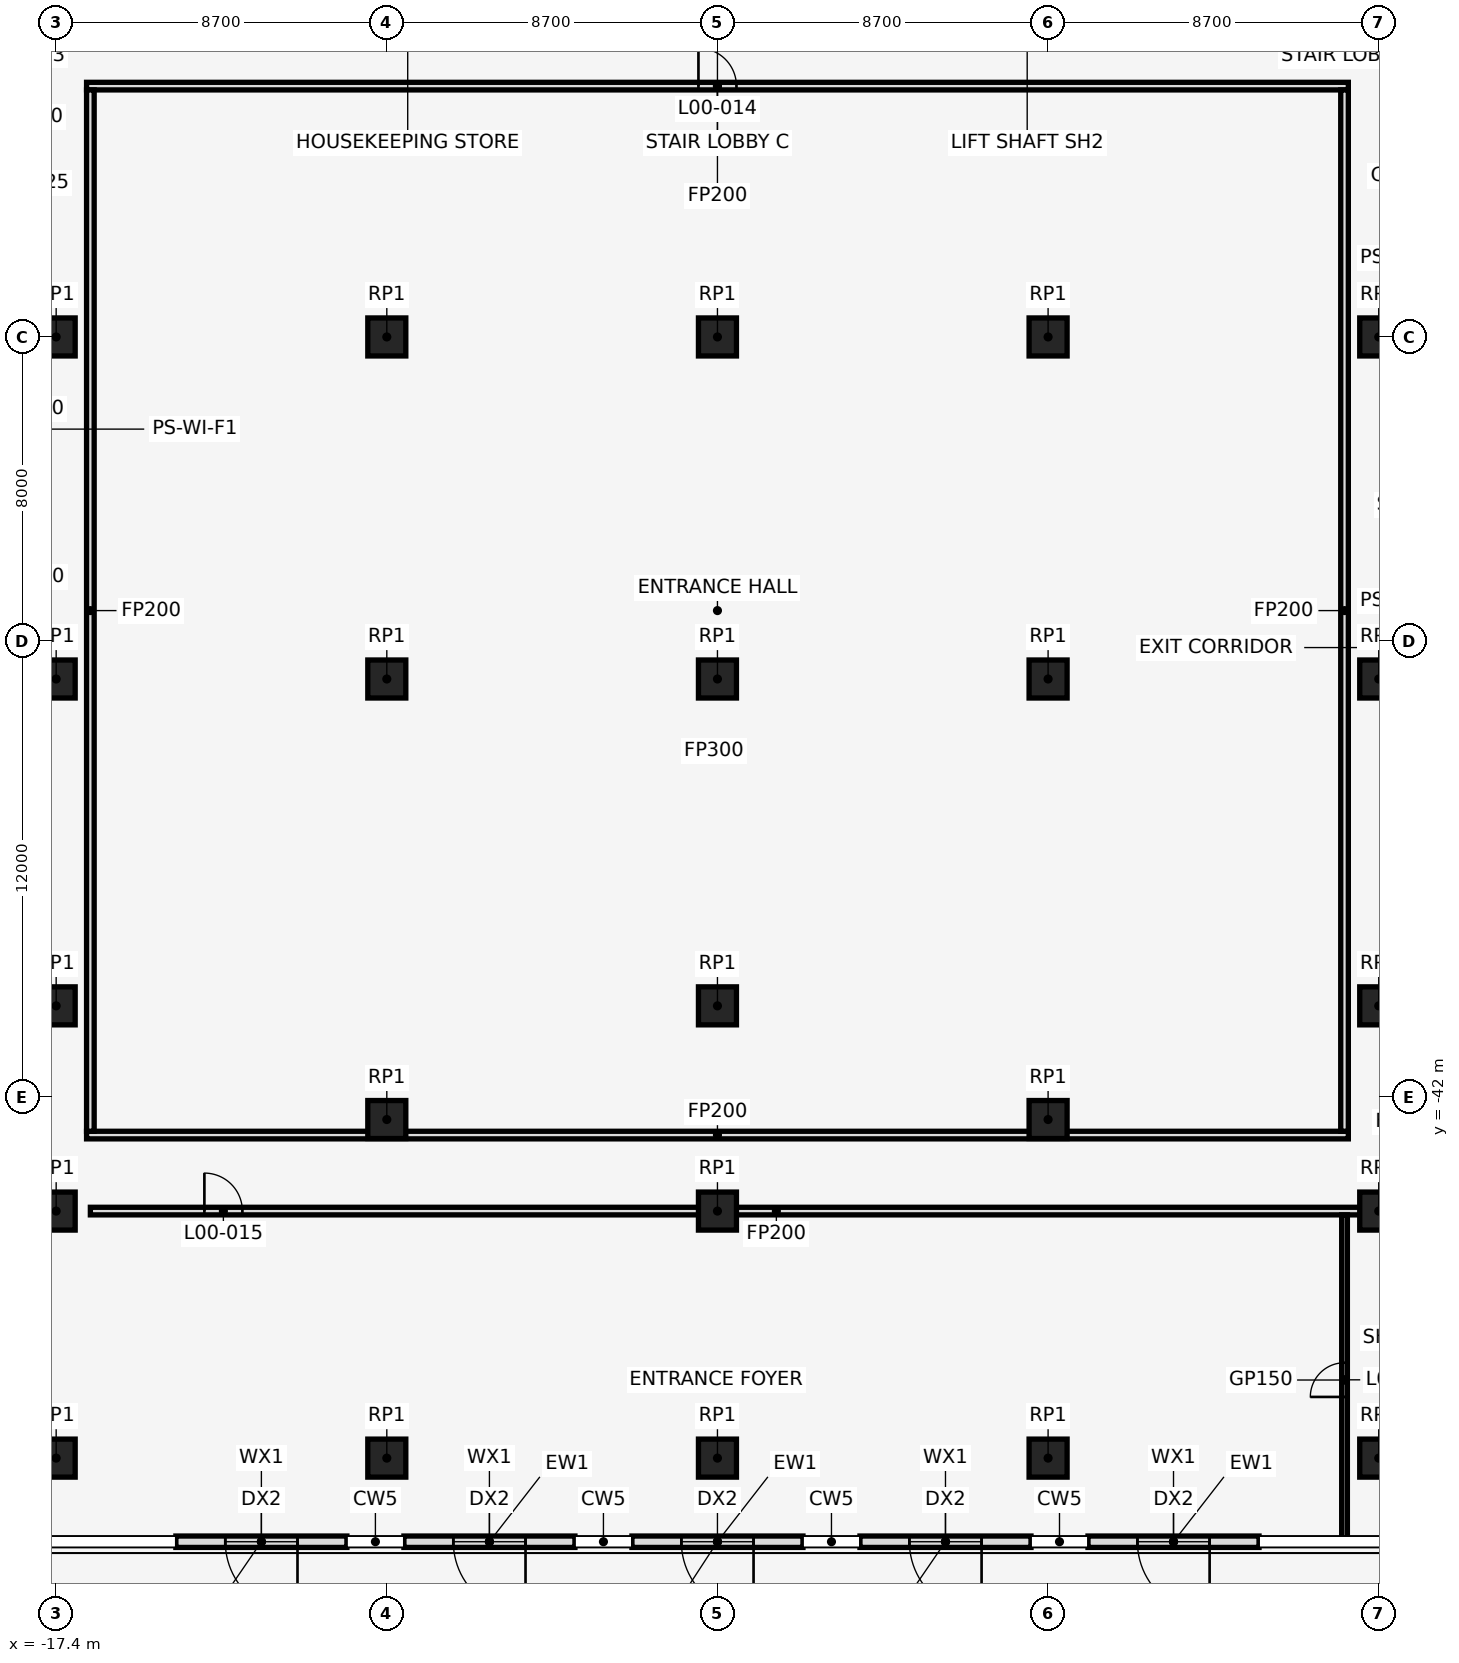
"""IFC4 building model, lengths in metres.
Left out: names, types, materials, properties, quantities, classifications, styles, units other than length and angle.
Written with IfcOpenShell. Run it as: python <this file> out.ifc"""

import sys

from ifc_helpers import new_model, si_unit, direction, frame, frame_2d, origin, origin_2d, place, context, subcontext, project, spatial, rectangle, extrude, element, fill, save


model = new_model("IFC4")
c1 = context("Model", 3, precision=1e-05, world=origin(), true_north=direction((0.0, 1.0)))
c2 = subcontext(c1, "Body", "Model", "MODEL_VIEW")
j1 = project(units=[si_unit("LENGTHUNIT", "METRE"), si_unit("PLANEANGLEUNIT", "RADIAN")], contexts=[c1])
p1 = place(None, origin())
s1 = spatial("IfcSite", under=j1, at=p1, CompositionType="ELEMENT")
p2 = place(p1, origin())
s2 = spatial("IfcBuilding", under=s1, at=p2, CompositionType="ELEMENT")
p3 = place(p2, origin())
s3 = spatial("IfcBuildingStorey", under=s2, at=p3, CompositionType="ELEMENT", Elevation=0.0)
for number, where, z_axis, x_axis in (
    (1, (-17.4, -39.6, 0.0), (0.0, 0.0, 1.0), (1.0, 0.0, 0.0)),
    (2, (-8.7, -42.591, 0.0), (0.0, 0.0, 1.0), (1.0, 0.0, 0.0)),
    (3, (0.0, -39.6, 0.0), (0.0, 0.0, 1.0), (1.0, 0.0, 0.0)),
    (4, (8.7, -42.591, 0.0), (0.0, 0.0, 1.0), (1.0, 0.0, 0.0)),
    (5, (17.4, -39.6, 0.0), (0.0, 0.0, 1.0), (1.0, 0.0, 0.0)),
    (6, (-17.4, -22.0, 0.0), (0.0, 0.0, 1.0), (1.0, 0.0, 0.0)),
    (7, (-8.7, -22.0, 0.0), (0.0, 0.0, 1.0), (1.0, 0.0, 0.0)),
    (8, (0.0, -22.0, 0.0), (0.0, 0.0, 1.0), (1.0, 0.0, 0.0)),
    (9, (8.7, -22.0, 0.0), (0.0, 0.0, 1.0), (1.0, 0.0, 0.0)),
    (10, (17.4, -22.0, 0.0), (0.0, 0.0, 1.0), (1.0, 0.0, 0.0)),
    (11, (-17.4, -31.0, 0.0), (0.0, 0.0, 1.0), (1.0, 0.0, 0.0)),
    (12, (-17.4, -45.0, 0.0), (0.0, 0.0, 1.0), (1.0, 0.0, 0.0)),
    (13, (-17.4, -51.5, 0.0), (0.0, 0.0, 1.0), (1.0, 0.0, 0.0)),
    (14, (-8.7, -31.0, 0.0), (0.0, 0.0, 1.0), (1.0, 0.0, 0.0)),
    (15, (-8.7, -51.5, 0.0), (0.0, 0.0, 1.0), (1.0, 0.0, 0.0)),
    (16, (0.0, -31.0, 0.0), (0.0, 0.0, 1.0), (1.0, 0.0, 0.0)),
    (17, (0.0, -45.0, 0.0), (0.0, 0.0, 1.0), (1.0, 0.0, 0.0)),
    (18, (0.0, -51.5, 0.0), (0.0, 0.0, 1.0), (1.0, 0.0, 0.0)),
    (19, (8.7, -31.0, 0.0), (0.0, 0.0, 1.0), (1.0, 0.0, 0.0)),
    (20, (8.7, -51.5, 0.0), (0.0, 0.0, 1.0), (1.0, 0.0, 0.0)),
    (21, (17.4, -31.0, 0.0), (0.0, 0.0, 1.0), (1.0, 0.0, 0.0)),
    (22, (17.4, -45.0, 0.0), (0.0, 0.0, 1.0), (1.0, 0.0, 0.0)),
    (23, (17.4, -51.5, 0.0), (0.0, 0.0, 1.0), (1.0, 0.0, 0.0)),
):
    element("IfcColumn", number, at=place(p3, frame(where, z_axis=z_axis, x_axis=x_axis)), inside=s3, PredefinedType="COLUMN", context=c2, shape_type="SweptSolid", body=[
        extrude(rectangle(XDim=1.0, YDim=1.0, at=origin_2d()), origin(), (0.0, 0.0, 1.0), 8.0),
    ])
p4 = place(p3, frame((-9.75, -53.7, 0.0), z_axis=(0.0, 0.0, 1.0), x_axis=(-1.0, 0.0, 0.0)))
e24 = element("IfcWall", 24, at=p4, inside=s3, PredefinedType="STANDARD", context=c2, shape_type="SweptSolid", body=[
    extrude(rectangle(XDim=4.5, YDim=0.3, at=frame_2d((2.25, 0.0))), origin(), (0.0, 0.0, 1.0), 7.7),
])
p5 = place(p4, frame((1.3, 0.0, 0.0)))
e25 = element("IfcOpeningElement", 25, at=p5, cuts=e24, PredefinedType="OPENING", context=c2, shape_type="SweptSolid", body=[
    extrude(rectangle(XDim=1.9, YDim=2.6, at=frame_2d((0.95, 1.3))), frame((0.0, 0.162, 0.0), z_axis=(0.0, -1.0, 0.0), x_axis=(1.0, 0.0, 0.0)), (0.0, 0.0, 1.0), 0.324),
])
p6 = place(p4, frame((1.3, 0.0, 3.3)))
e26 = element("IfcOpeningElement", 26, at=p6, cuts=e24, PredefinedType="OPENING", context=c2, shape_type="SweptSolid", body=[
    extrude(rectangle(XDim=1.9, YDim=3.0, at=frame_2d((0.95, 1.5))), frame((0.0, 0.162, 0.0), z_axis=(0.0, -1.0, 0.0), x_axis=(1.0, 0.0, 0.0)), (0.0, 0.0, 1.0), 0.324),
])
p7 = place(p3, frame((-3.75, -53.7, 0.0), z_axis=(0.0, 0.0, 1.0), x_axis=(-1.0, 0.0, 0.0)))
e27 = element("IfcWall", 27, at=p7, inside=s3, PredefinedType="STANDARD", context=c2, shape_type="SweptSolid", body=[
    extrude(rectangle(XDim=4.5, YDim=0.3, at=frame_2d((2.25, 0.0))), origin(), (0.0, 0.0, 1.0), 7.7),
])
p8 = place(p7, frame((1.3, 0.0, 0.0)))
e28 = element("IfcOpeningElement", 28, at=p8, cuts=e27, PredefinedType="OPENING", context=c2, shape_type="SweptSolid", body=[
    extrude(rectangle(XDim=1.9, YDim=2.6, at=frame_2d((0.95, 1.3))), frame((0.0, 0.162, 0.0), z_axis=(0.0, -1.0, 0.0), x_axis=(1.0, 0.0, 0.0)), (0.0, 0.0, 1.0), 0.324),
])
p9 = place(p7, frame((1.3, 0.0, 3.3)))
e29 = element("IfcOpeningElement", 29, at=p9, cuts=e27, PredefinedType="OPENING", context=c2, shape_type="SweptSolid", body=[
    extrude(rectangle(XDim=1.9, YDim=3.0, at=frame_2d((0.95, 1.5))), frame((0.0, 0.162, 0.0), z_axis=(0.0, -1.0, 0.0), x_axis=(1.0, 0.0, 0.0)), (0.0, 0.0, 1.0), 0.324),
])
p10 = place(p3, frame((2.25, -53.7, 0.0), z_axis=(0.0, 0.0, 1.0), x_axis=(-1.0, 0.0, 0.0)))
e30 = element("IfcWall", 30, at=p10, inside=s3, PredefinedType="STANDARD", context=c2, shape_type="SweptSolid", body=[
    extrude(rectangle(XDim=4.5, YDim=0.3, at=frame_2d((2.25, 0.0))), origin(), (0.0, 0.0, 1.0), 7.7),
])
p11 = place(p10, frame((1.3, 0.0, 0.0)))
e31 = element("IfcOpeningElement", 31, at=p11, cuts=e30, PredefinedType="OPENING", context=c2, shape_type="SweptSolid", body=[
    extrude(rectangle(XDim=1.9, YDim=2.6, at=frame_2d((0.95, 1.3))), frame((0.0, 0.162, 0.0), z_axis=(0.0, -1.0, 0.0), x_axis=(1.0, 0.0, 0.0)), (0.0, 0.0, 1.0), 0.324),
])
p12 = place(p10, frame((1.3, 0.0, 3.3)))
e32 = element("IfcOpeningElement", 32, at=p12, cuts=e30, PredefinedType="OPENING", context=c2, shape_type="SweptSolid", body=[
    extrude(rectangle(XDim=1.9, YDim=3.0, at=frame_2d((0.95, 1.5))), frame((0.0, 0.162, 0.0), z_axis=(0.0, -1.0, 0.0), x_axis=(1.0, 0.0, 0.0)), (0.0, 0.0, 1.0), 0.324),
])
p13 = place(p3, frame((8.25, -53.7, 0.0), z_axis=(0.0, 0.0, 1.0), x_axis=(-1.0, 0.0, 0.0)))
e33 = element("IfcWall", 33, at=p13, inside=s3, PredefinedType="STANDARD", context=c2, shape_type="SweptSolid", body=[
    extrude(rectangle(XDim=4.5, YDim=0.3, at=frame_2d((2.25, 0.0))), origin(), (0.0, 0.0, 1.0), 7.7),
])
p14 = place(p13, frame((1.3, 0.0, 0.0)))
e34 = element("IfcOpeningElement", 34, at=p14, cuts=e33, PredefinedType="OPENING", context=c2, shape_type="SweptSolid", body=[
    extrude(rectangle(XDim=1.9, YDim=2.6, at=frame_2d((0.95, 1.3))), frame((0.0, 0.162, 0.0), z_axis=(0.0, -1.0, 0.0), x_axis=(1.0, 0.0, 0.0)), (0.0, 0.0, 1.0), 0.324),
])
p15 = place(p13, frame((1.3, 0.0, 3.3)))
e35 = element("IfcOpeningElement", 35, at=p15, cuts=e33, PredefinedType="OPENING", context=c2, shape_type="SweptSolid", body=[
    extrude(rectangle(XDim=1.9, YDim=3.0, at=frame_2d((0.95, 1.5))), frame((0.0, 0.162, 0.0), z_axis=(0.0, -1.0, 0.0), x_axis=(1.0, 0.0, 0.0)), (0.0, 0.0, 1.0), 0.324),
])
p16 = place(p3, frame((14.25, -53.7, 0.0), z_axis=(0.0, 0.0, 1.0), x_axis=(-1.0, 0.0, 0.0)))
e36 = element("IfcWall", 36, at=p16, inside=s3, PredefinedType="STANDARD", context=c2, shape_type="SweptSolid", body=[
    extrude(rectangle(XDim=4.5, YDim=0.3, at=frame_2d((2.25, 0.0))), origin(), (0.0, 0.0, 1.0), 7.7),
])
p17 = place(p16, frame((1.3, 0.0, 0.0)))
e37 = element("IfcOpeningElement", 37, at=p17, cuts=e36, PredefinedType="OPENING", context=c2, shape_type="SweptSolid", body=[
    extrude(rectangle(XDim=1.9, YDim=2.6, at=frame_2d((0.95, 1.3))), frame((0.0, 0.162, 0.0), z_axis=(0.0, -1.0, 0.0), x_axis=(1.0, 0.0, 0.0)), (0.0, 0.0, 1.0), 0.324),
])
p18 = place(p16, frame((1.3, 0.0, 3.3)))
e38 = element("IfcOpeningElement", 38, at=p18, cuts=e36, PredefinedType="OPENING", context=c2, shape_type="SweptSolid", body=[
    extrude(rectangle(XDim=1.9, YDim=3.0, at=frame_2d((0.95, 1.5))), frame((0.0, 0.162, 0.0), z_axis=(0.0, -1.0, 0.0), x_axis=(1.0, 0.0, 0.0)), (0.0, 0.0, 1.0), 0.324),
])
p19 = place(p3, frame((-16.5, -45.0, 0.0), z_axis=(0.0, 0.0, 1.0), x_axis=(1.0, 0.0, 0.0)))
e39 = element("IfcWall", 39, at=p19, inside=s3, PredefinedType="PARTITIONING", context=c2, shape_type="SweptSolid", body=[
    extrude(rectangle(XDim=36.1, YDim=0.2, at=frame_2d((18.05, 0.0))), origin(), (0.0, 0.0, 1.0), 7.7),
])
p20 = place(p19, frame((3.0, 0.0, 0.0)))
e40 = element("IfcOpeningElement", 40, at=p20, cuts=e39, PredefinedType="OPENING", context=c2, shape_type="SweptSolid", body=[
    extrude(rectangle(XDim=1.0, YDim=2.1, at=frame_2d((0.5, 1.05))), frame((0.0, 0.112, 0.0), z_axis=(0.0, -1.0, 0.0), x_axis=(1.0, 0.0, 0.0)), (0.0, 0.0, 1.0), 0.224),
])
p21 = place(p3, frame((-16.6, -43.0, 0.0), z_axis=(0.0, 0.0, 1.0), x_axis=(1.0, 0.0, 0.0)))
e41 = element("IfcWall", 41, at=p21, inside=s3, PredefinedType="PARTITIONING", context=c2, shape_type="SweptSolid", body=[
    extrude(rectangle(XDim=33.2, YDim=0.2, at=frame_2d((16.6, 0.0))), origin(), (0.0, 0.0, 1.0), 7.7),
])
p22 = place(p3, frame((-16.6, -15.4, 0.0), z_axis=(0.0, 0.0, 1.0), x_axis=(1.0, 0.0, 0.0)))
e42 = element("IfcWall", 42, at=p22, inside=s3, PredefinedType="PARTITIONING", context=c2, shape_type="SweptSolid", body=[
    extrude(rectangle(XDim=33.2, YDim=0.2, at=frame_2d((16.6, 0.0))), origin(), (0.0, 0.0, 1.0), 7.7),
])
p23 = place(p22, frame((16.1, 0.0, 0.0)))
e43 = element("IfcOpeningElement", 43, at=p23, cuts=e42, PredefinedType="OPENING", context=c2, shape_type="SweptSolid", body=[
    extrude(rectangle(XDim=1.0, YDim=2.1, at=frame_2d((0.5, 1.05))), frame((0.0, 0.112, 0.0), z_axis=(0.0, -1.0, 0.0), x_axis=(1.0, 0.0, 0.0)), (0.0, 0.0, 1.0), 0.224),
])
p24 = place(p3, frame((-16.5, -42.9, 0.0), z_axis=(0.0, 0.0, 1.0), x_axis=(0.0, 1.0, 0.0)))
e44 = element("IfcWall", 44, at=p24, inside=s3, PredefinedType="PARTITIONING", context=c2, shape_type="SweptSolid", body=[
    extrude(rectangle(XDim=27.4, YDim=0.2, at=frame_2d((13.7, 0.0))), origin(), (0.0, 0.0, 1.0), 7.7),
])
p25 = place(p3, frame((16.5, -53.79, 0.0), z_axis=(0.0, 0.0, 1.0), x_axis=(0.0, 1.0, 0.0)))
e45 = element("IfcWall", 45, at=p25, inside=s3, PredefinedType="PARTITIONING", context=c2, shape_type="SweptSolid", body=[
    extrude(rectangle(XDim=8.69, YDim=0.15, at=frame_2d((4.345, 0.0))), origin(), (0.0, 0.0, 1.0), 7.7),
])
p26 = place(p25, frame((3.9, 0.0, 0.0)))
e46 = element("IfcOpeningElement", 46, at=p26, cuts=e45, PredefinedType="OPENING", context=c2, shape_type="SweptSolid", body=[
    extrude(rectangle(XDim=0.9, YDim=2.1, at=frame_2d((0.45, 1.05))), frame((0.0, 0.087, 0.0), z_axis=(0.0, -1.0, 0.0), x_axis=(1.0, 0.0, 0.0)), (0.0, 0.0, 1.0), 0.174),
])
p27 = place(p3, frame((16.5, -42.9, 0.0), z_axis=(0.0, 0.0, 1.0), x_axis=(0.0, 1.0, 0.0)))
e47 = element("IfcWall", 47, at=p27, inside=s3, PredefinedType="PARTITIONING", context=c2, shape_type="SweptSolid", body=[
    extrude(rectangle(XDim=27.4, YDim=0.2, at=frame_2d((13.7, 0.0))), origin(), (0.0, 0.0, 1.0), 7.7),
])
p28 = place(p5, origin())
e48 = element("IfcDoor", 48, at=p28, inside=s3, OperationType="SINGLE_SWING_LEFT", PredefinedType="DOOR", context=c2, shape_type="SweptSolid", body=[
    extrude(rectangle(XDim=1.9, YDim=2.6, at=frame_2d((0.95, 1.3))), frame((0.0, 0.025, 0.0), z_axis=(0.0, -1.0, 0.0), x_axis=(1.0, 0.0, 0.0)), (0.0, 0.0, 1.0), 0.05),
])
fill(e25, e48)
p29 = place(p6, origin())
e49 = element("IfcWindow", 49, at=p29, inside=s3, PartitioningType="SINGLE_PANEL", PredefinedType="WINDOW", context=c2, shape_type="SweptSolid", body=[
    extrude(rectangle(XDim=1.9, YDim=3.0, at=frame_2d((0.95, 1.5))), frame((0.0, 0.03, 0.0), z_axis=(0.0, -1.0, 0.0), x_axis=(1.0, 0.0, 0.0)), (0.0, 0.0, 1.0), 0.06),
])
fill(e26, e49)
p30 = place(p8, origin())
e50 = element("IfcDoor", 50, at=p30, inside=s3, OperationType="SINGLE_SWING_LEFT", PredefinedType="DOOR", context=c2, shape_type="SweptSolid", body=[
    extrude(rectangle(XDim=1.9, YDim=2.6, at=frame_2d((0.95, 1.3))), frame((0.0, 0.025, 0.0), z_axis=(0.0, -1.0, 0.0), x_axis=(1.0, 0.0, 0.0)), (0.0, 0.0, 1.0), 0.05),
])
fill(e28, e50)
p31 = place(p9, origin())
e51 = element("IfcWindow", 51, at=p31, inside=s3, PartitioningType="SINGLE_PANEL", PredefinedType="WINDOW", context=c2, shape_type="SweptSolid", body=[
    extrude(rectangle(XDim=1.9, YDim=3.0, at=frame_2d((0.95, 1.5))), frame((0.0, 0.03, 0.0), z_axis=(0.0, -1.0, 0.0), x_axis=(1.0, 0.0, 0.0)), (0.0, 0.0, 1.0), 0.06),
])
fill(e29, e51)
p32 = place(p11, origin())
e52 = element("IfcDoor", 52, at=p32, inside=s3, OperationType="SINGLE_SWING_LEFT", PredefinedType="DOOR", context=c2, shape_type="SweptSolid", body=[
    extrude(rectangle(XDim=1.9, YDim=2.6, at=frame_2d((0.95, 1.3))), frame((0.0, 0.025, 0.0), z_axis=(0.0, -1.0, 0.0), x_axis=(1.0, 0.0, 0.0)), (0.0, 0.0, 1.0), 0.05),
])
fill(e31, e52)
p33 = place(p12, origin())
e53 = element("IfcWindow", 53, at=p33, inside=s3, PartitioningType="SINGLE_PANEL", PredefinedType="WINDOW", context=c2, shape_type="SweptSolid", body=[
    extrude(rectangle(XDim=1.9, YDim=3.0, at=frame_2d((0.95, 1.5))), frame((0.0, 0.03, 0.0), z_axis=(0.0, -1.0, 0.0), x_axis=(1.0, 0.0, 0.0)), (0.0, 0.0, 1.0), 0.06),
])
fill(e32, e53)
p34 = place(p14, origin())
e54 = element("IfcDoor", 54, at=p34, inside=s3, OperationType="SINGLE_SWING_LEFT", PredefinedType="DOOR", context=c2, shape_type="SweptSolid", body=[
    extrude(rectangle(XDim=1.9, YDim=2.6, at=frame_2d((0.95, 1.3))), frame((0.0, 0.025, 0.0), z_axis=(0.0, -1.0, 0.0), x_axis=(1.0, 0.0, 0.0)), (0.0, 0.0, 1.0), 0.05),
])
fill(e34, e54)
p35 = place(p15, origin())
e55 = element("IfcWindow", 55, at=p35, inside=s3, PartitioningType="SINGLE_PANEL", PredefinedType="WINDOW", context=c2, shape_type="SweptSolid", body=[
    extrude(rectangle(XDim=1.9, YDim=3.0, at=frame_2d((0.95, 1.5))), frame((0.0, 0.03, 0.0), z_axis=(0.0, -1.0, 0.0), x_axis=(1.0, 0.0, 0.0)), (0.0, 0.0, 1.0), 0.06),
])
fill(e35, e55)
p36 = place(p17, origin())
e56 = element("IfcDoor", 56, at=p36, inside=s3, OperationType="SINGLE_SWING_LEFT", PredefinedType="DOOR", context=c2, shape_type="SweptSolid", body=[
    extrude(rectangle(XDim=1.9, YDim=2.6, at=frame_2d((0.95, 1.3))), frame((0.0, 0.025, 0.0), z_axis=(0.0, -1.0, 0.0), x_axis=(1.0, 0.0, 0.0)), (0.0, 0.0, 1.0), 0.05),
])
fill(e37, e56)
p37 = place(p18, origin())
e57 = element("IfcWindow", 57, at=p37, inside=s3, PartitioningType="SINGLE_PANEL", PredefinedType="WINDOW", context=c2, shape_type="SweptSolid", body=[
    extrude(rectangle(XDim=1.9, YDim=3.0, at=frame_2d((0.95, 1.5))), frame((0.0, 0.03, 0.0), z_axis=(0.0, -1.0, 0.0), x_axis=(1.0, 0.0, 0.0)), (0.0, 0.0, 1.0), 0.06),
])
fill(e38, e57)
p38 = place(p23, frame((1.0, 0.0, 0.0), z_axis=(0.0, 0.0, 1.0), x_axis=(-1.0, 0.0, 0.0)))
e58 = element("IfcDoor", 58, at=p38, inside=s3, OperationType="SINGLE_SWING_RIGHT", PredefinedType="DOOR", context=c2, shape_type="SweptSolid", body=[
    extrude(rectangle(XDim=1.0, YDim=2.1, at=frame_2d((0.5, 1.05))), frame((0.0, 0.025, 0.0), z_axis=(0.0, -1.0, 0.0), x_axis=(1.0, 0.0, 0.0)), (0.0, 0.0, 1.0), 0.05),
])
fill(e43, e58)
p39 = place(p20, frame((1.0, 0.0, 0.0), z_axis=(0.0, 0.0, 1.0), x_axis=(-1.0, 0.0, 0.0)))
e59 = element("IfcDoor", 59, at=p39, inside=s3, OperationType="SINGLE_SWING_RIGHT", PredefinedType="DOOR", context=c2, shape_type="SweptSolid", body=[
    extrude(rectangle(XDim=1.0, YDim=2.1, at=frame_2d((0.5, 1.05))), frame((0.0, 0.025, 0.0), z_axis=(0.0, -1.0, 0.0), x_axis=(1.0, 0.0, 0.0)), (0.0, 0.0, 1.0), 0.05),
])
fill(e40, e59)
p40 = place(p26, frame((0.9, 0.0, 0.0), z_axis=(0.0, 0.0, 1.0), x_axis=(-1.0, 0.0, 0.0)))
e60 = element("IfcDoor", 60, at=p40, inside=s3, OperationType="SINGLE_SWING_RIGHT", PredefinedType="DOOR", context=c2, shape_type="SweptSolid", body=[
    extrude(rectangle(XDim=0.9, YDim=2.1, at=frame_2d((0.45, 1.05))), frame((0.0, 0.025, 0.0), z_axis=(0.0, -1.0, 0.0), x_axis=(1.0, 0.0, 0.0)), (0.0, 0.0, 1.0), 0.05),
])
fill(e46, e60)
save(model, sys.argv[1])
